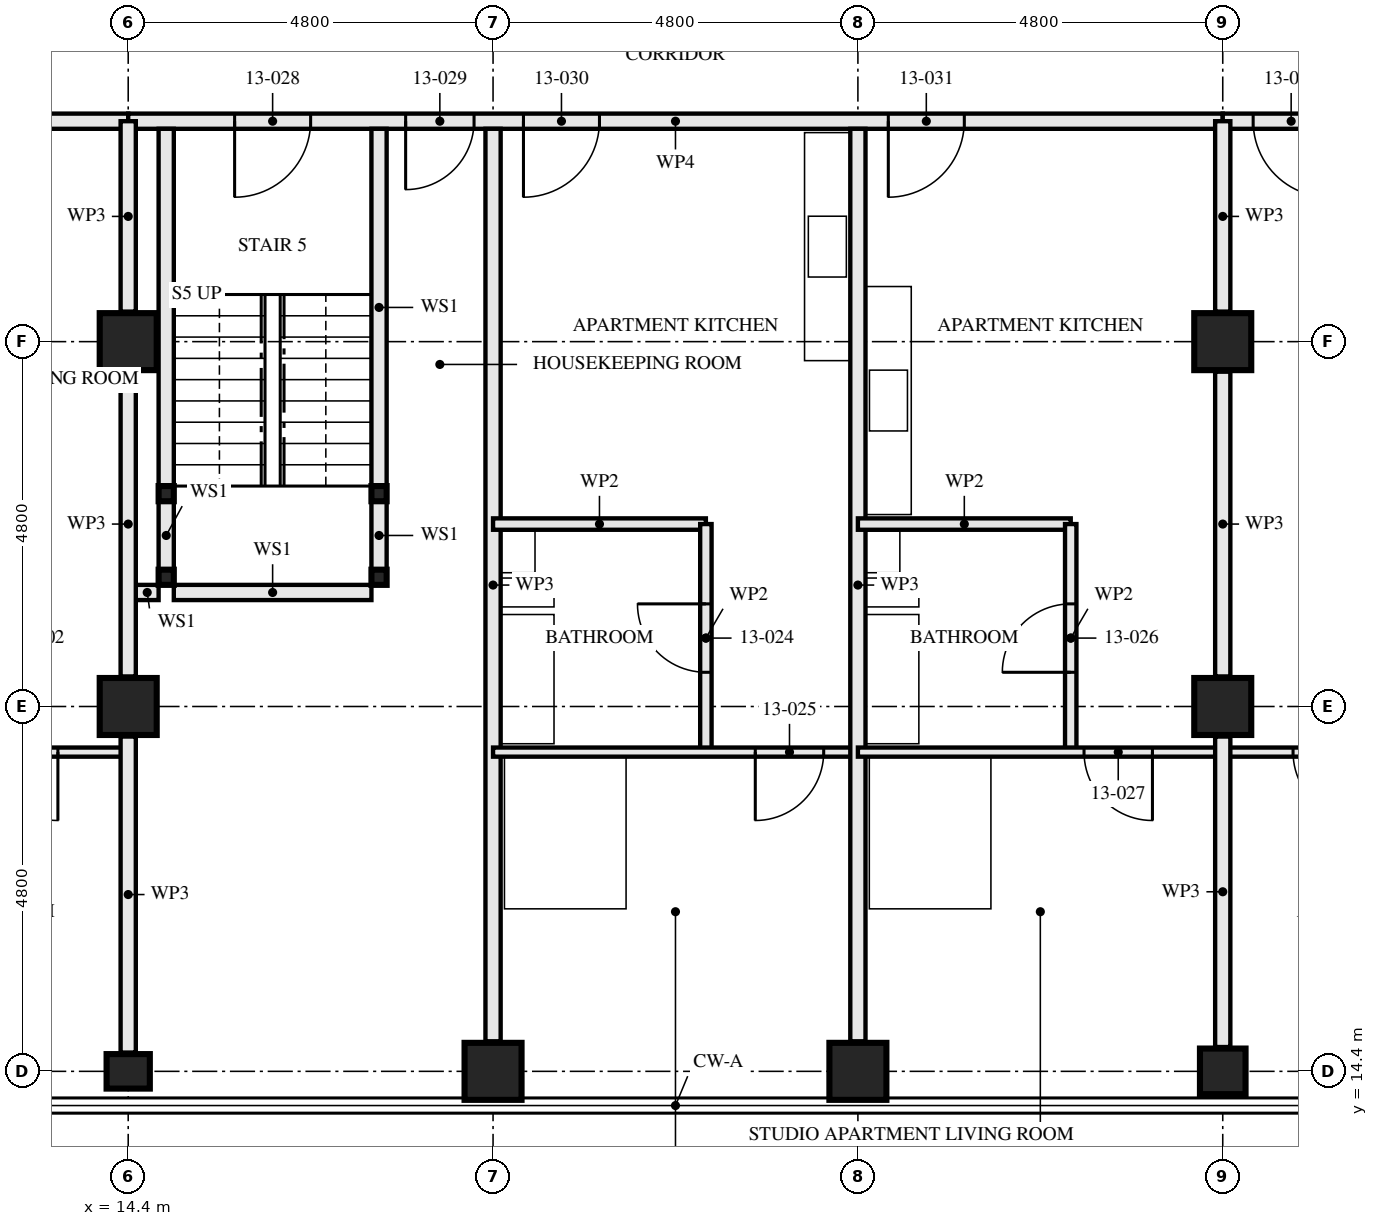
"""IFC4 building model, lengths in metres.
Left out: names, types, materials, properties, quantities, classifications, styles, units other than length and angle.
Written with IfcOpenShell. Run it as: python <this file> out.ifc"""

import sys

from ifc_helpers import new_model, si_unit, direction, frame, frame_2d, origin, origin_2d, place, context, subcontext, project, spatial, rectangle, hollow_rectangle, i_section, extrude, element, fill, save


model = new_model("IFC4")
c1 = context("Model", 3, precision=1e-05, world=origin(), true_north=direction((0.0, 1.0)))
c2 = subcontext(c1, "Body", "Model", "MODEL_VIEW")
j1 = project(units=[si_unit("LENGTHUNIT", "METRE"), si_unit("PLANEANGLEUNIT", "RADIAN")], contexts=[c1])
p1 = place(None, origin())
s1 = spatial("IfcSite", under=j1, at=p1, CompositionType="ELEMENT")
p2 = place(p1, origin())
s2 = spatial("IfcBuilding", under=s1, at=p2, CompositionType="ELEMENT")
p3 = place(p2, frame((0.0, 0.0, 51.5)))
s3 = spatial("IfcBuildingStorey", under=s2, at=p3, CompositionType="ELEMENT", Elevation=51.5)
p4 = place(p3, frame((14.4, 14.4, 0.0), z_axis=(0.0, 0.0, 1.0), x_axis=(0.0, 1.0, 0.0)))
e1 = element("IfcColumn", 1, at=p4, inside=s3, PredefinedType="COLUMN", context=c2, shape_type="SweptSolid", body=[
    extrude(i_section(OverallWidth=0.454, OverallDepth=0.569, WebThickness=0.078, FlangeThickness=0.125, FilletRadius=0.015, at=origin_2d()), origin(), (0.0, 0.0, 1.0), 3.5),
])
for number, where, z_axis, x_axis in (
    (2, (14.4, 19.2, 0.0), (0.0, 0.0, 1.0), (1.0, 0.0, 0.0)),
    (3, (14.4, 24.0, 0.0), (0.0, 0.0, 1.0), (1.0, 0.0, 0.0)),
    (4, (19.2, 14.4, 0.0), (0.0, 0.0, 1.0), (0.0, 1.0, 0.0)),
    (5, (24.0, 14.4, 0.0), (0.0, 0.0, 1.0), (0.0, 1.0, 0.0)),
):
    element("IfcColumn", number, at=place(p3, frame(where, z_axis=z_axis, x_axis=x_axis)), inside=s3, PredefinedType="COLUMN", context=c2, shape_type="SweptSolid", body=[
        extrude(hollow_rectangle(XDim=0.75, YDim=0.75, WallThickness=0.08, at=origin_2d()), origin(), (0.0, 0.0, 1.0), 3.5),
    ])
p5 = place(p3, frame((28.8, 14.4, 0.0), z_axis=(0.0, 0.0, 1.0), x_axis=(0.0, 1.0, 0.0)))
e6 = element("IfcColumn", 6, at=p5, inside=s3, PredefinedType="COLUMN", context=c2, shape_type="SweptSolid", body=[
    extrude(hollow_rectangle(XDim=0.6, YDim=0.6, WallThickness=0.08, at=origin_2d()), origin(), (0.0, 0.0, 1.0), 3.5),
])
for number, where, z_axis, x_axis in (
    (7, (28.8, 19.2, 0.0), (0.0, 0.0, 1.0), (1.0, 0.0, 0.0)),
    (8, (28.8, 24.0, 0.0), (0.0, 0.0, 1.0), (1.0, 0.0, 0.0)),
):
    element("IfcColumn", number, at=place(p3, frame(where, z_axis=z_axis, x_axis=x_axis)), inside=s3, PredefinedType="COLUMN", context=c2, shape_type="SweptSolid", body=[
        extrude(hollow_rectangle(XDim=0.75, YDim=0.75, WallThickness=0.08, at=origin_2d()), origin(), (0.0, 0.0, 1.0), 3.5),
    ])
for number, where, z_axis, x_axis in (
    (9, (14.9, 20.9, 0.0), (0.0, 0.0, 1.0), (1.0, 0.0, 0.0)),
    (10, (17.7, 20.9, 0.0), (0.0, 0.0, 1.0), (1.0, 0.0, 0.0)),
    (11, (14.9, 22.0, 0.0), (0.0, 0.0, 1.0), (1.0, 0.0, 0.0)),
    (12, (17.7, 22.0, 0.0), (0.0, 0.0, 1.0), (1.0, 0.0, 0.0)),
):
    element("IfcColumn", number, at=place(p3, frame(where, z_axis=z_axis, x_axis=x_axis)), inside=s3, PredefinedType="COLUMN", context=c2, shape_type="SweptSolid", body=[
        extrude(hollow_rectangle(XDim=0.2, YDim=0.2, WallThickness=0.008, at=origin_2d()), origin(), (0.0, 0.0, 1.0), 3.33),
    ])
p6 = place(p3, frame((9.6, 18.6, 0.0), z_axis=(0.0, 0.0, 1.0), x_axis=(1.0, 0.0, 0.0)))
e13 = element("IfcWall", 13, at=p6, inside=s3, PredefinedType="PARTITIONING", context=c2, shape_type="SweptSolid", body=[
    extrude(rectangle(XDim=4.8, YDim=0.12, at=frame_2d((2.4, 0.0))), origin(), (0.0, 0.0, 1.0), 3.33),
])
p7 = place(p6, frame((2.975, 0.0, 0.0)))
e14 = element("IfcOpeningElement", 14, at=p7, cuts=e13, PredefinedType="OPENING", context=c2, shape_type="SweptSolid", body=[
    extrude(rectangle(XDim=0.9, YDim=2.1, at=frame_2d((0.45, 1.05))), frame((0.0, 0.071, 0.0), z_axis=(0.0, -1.0, 0.0), x_axis=(1.0, 0.0, 0.0)), (0.0, 0.0, 1.0), 0.141),
])
p8 = place(p3, frame((4.8, 26.9, 0.0), z_axis=(0.0, 0.0, 1.0), x_axis=(1.0, 0.0, 0.0)))
e15 = element("IfcWall", 15, at=p8, inside=s3, PredefinedType="PARTITIONING", context=c2, shape_type="SweptSolid", body=[
    extrude(rectangle(XDim=9.6, YDim=0.2, at=frame_2d((4.8, 0.0))), origin(), (0.0, 0.0, 1.0), 3.33),
])
p9 = place(p8, frame((0.4, 0.0, 0.0)))
e16 = element("IfcOpeningElement", 16, at=p9, cuts=e15, PredefinedType="OPENING", context=c2, shape_type="SweptSolid", body=[
    extrude(rectangle(XDim=1.0, YDim=2.1, at=frame_2d((0.5, 1.05))), frame((0.0, 0.111, 0.0), z_axis=(0.0, -1.0, 0.0), x_axis=(1.0, 0.0, 0.0)), (0.0, 0.0, 1.0), 0.221),
])
p10 = place(p3, frame((14.9, 21.0, 0.0), z_axis=(0.0, 0.0, 1.0), x_axis=(0.0, 1.0, 0.0)))
e17 = element("IfcWall", 17, at=p10, inside=s3, PredefinedType="SOLIDWALL", context=c2, shape_type="SweptSolid", body=[
    extrude(rectangle(XDim=0.9, YDim=0.2, at=frame_2d((0.45, 0.0))), origin(), (0.0, 0.0, 1.0), 2.99),
])
p11 = place(p3, frame((14.9, 22.1, 0.0), z_axis=(0.0, 0.0, 1.0), x_axis=(0.0, 1.0, 0.0)))
e18 = element("IfcWall", 18, at=p11, inside=s3, PredefinedType="SOLIDWALL", context=c2, shape_type="SweptSolid", body=[
    extrude(rectangle(XDim=4.7, YDim=0.2, at=frame_2d((2.35, 0.0))), origin(), (0.0, 0.0, 1.0), 2.99),
])
p12 = place(p3, frame((17.7, 21.0, 0.0), z_axis=(0.0, 0.0, 1.0), x_axis=(0.0, 1.0, 0.0)))
e19 = element("IfcWall", 19, at=p12, inside=s3, PredefinedType="SOLIDWALL", context=c2, shape_type="SweptSolid", body=[
    extrude(rectangle(XDim=0.9, YDim=0.2, at=frame_2d((0.45, 0.0))), origin(), (0.0, 0.0, 1.0), 2.99),
])
p13 = place(p3, frame((17.7, 22.1, 0.0), z_axis=(0.0, 0.0, 1.0), x_axis=(0.0, 1.0, 0.0)))
e20 = element("IfcWall", 20, at=p13, inside=s3, PredefinedType="SOLIDWALL", context=c2, shape_type="SweptSolid", body=[
    extrude(rectangle(XDim=4.7, YDim=0.2, at=frame_2d((2.35, 0.0))), origin(), (0.0, 0.0, 1.0), 2.99),
])
p14 = place(p3, frame((14.5, 20.7, 0.0), z_axis=(0.0, 0.0, 1.0), x_axis=(1.0, 0.0, 0.0)))
e21 = element("IfcWall", 21, at=p14, inside=s3, PredefinedType="SOLIDWALL", context=c2, shape_type="SweptSolid", body=[
    extrude(rectangle(XDim=0.3, YDim=0.2, at=frame_2d((0.15, 0.0))), origin(), (0.0, 0.0, 1.0), 3.33),
])
p15 = place(p3, frame((15.0, 20.7, 0.0), z_axis=(0.0, 0.0, 1.0), x_axis=(1.0, 0.0, 0.0)))
e22 = element("IfcWall", 22, at=p15, inside=s3, PredefinedType="SOLIDWALL", context=c2, shape_type="SweptSolid", body=[
    extrude(rectangle(XDim=2.6, YDim=0.2, at=frame_2d((1.3, 0.0))), origin(), (0.0, 0.0, 1.0), 3.33),
])
p16 = place(p3, frame((19.2, 14.795, 0.0), z_axis=(0.0, 0.0, 1.0), x_axis=(0.0, 1.0, 0.0)))
e23 = element("IfcWall", 23, at=p16, inside=s3, PredefinedType="PARTITIONING", context=c2, shape_type="SweptSolid", body=[
    extrude(rectangle(XDim=12.005, YDim=0.2, at=frame_2d((6.002, 0.0))), origin(), (0.0, 0.0, 1.0), 2.55),
])
p17 = place(p3, frame((22.0, 18.6, 0.0), z_axis=(0.0, 0.0, 1.0), x_axis=(0.0, 1.0, 0.0)))
e24 = element("IfcWall", 24, at=p17, inside=s3, PredefinedType="PARTITIONING", context=c2, shape_type="SweptSolid", body=[
    extrude(rectangle(XDim=3.0, YDim=0.15, at=frame_2d((1.5, 0.0))), origin(), (0.0, 0.0, 1.0), 2.55),
])
p18 = place(p17, frame((1.05, 0.0, 0.0)))
e25 = element("IfcOpeningElement", 25, at=p18, cuts=e24, PredefinedType="OPENING", context=c2, shape_type="SweptSolid", body=[
    extrude(rectangle(XDim=0.9, YDim=2.1, at=frame_2d((0.45, 1.05))), frame((0.0, 0.085, 0.0), z_axis=(0.0, -1.0, 0.0), x_axis=(1.0, 0.0, 0.0)), (0.0, 0.0, 1.0), 0.171),
])
p19 = place(p3, frame((19.2, 21.6, 0.0), z_axis=(0.0, 0.0, 1.0), x_axis=(1.0, 0.0, 0.0)))
e26 = element("IfcWall", 26, at=p19, inside=s3, PredefinedType="PARTITIONING", context=c2, shape_type="SweptSolid", body=[
    extrude(rectangle(XDim=2.8, YDim=0.15, at=frame_2d((1.4, 0.0))), origin(), (0.0, 0.0, 1.0), 3.33),
])
p20 = place(p3, frame((19.2, 18.6, 0.0), z_axis=(0.0, 0.0, 1.0), x_axis=(1.0, 0.0, 0.0)))
e27 = element("IfcWall", 27, at=p20, inside=s3, PredefinedType="PARTITIONING", context=c2, shape_type="SweptSolid", body=[
    extrude(rectangle(XDim=4.8, YDim=0.12, at=frame_2d((2.4, 0.0))), origin(), (0.0, 0.0, 1.0), 3.33),
])
p21 = place(p20, frame((3.45, 0.0, 0.0)))
e28 = element("IfcOpeningElement", 28, at=p21, cuts=e27, PredefinedType="OPENING", context=c2, shape_type="SweptSolid", body=[
    extrude(rectangle(XDim=0.9, YDim=2.1, at=frame_2d((0.45, 1.05))), frame((0.0, 0.071, 0.0), z_axis=(0.0, -1.0, 0.0), x_axis=(1.0, 0.0, 0.0)), (0.0, 0.0, 1.0), 0.141),
])
p22 = place(p3, frame((24.0, 14.795, 0.0), z_axis=(0.0, 0.0, 1.0), x_axis=(0.0, 1.0, 0.0)))
e29 = element("IfcWall", 29, at=p22, inside=s3, PredefinedType="PARTITIONING", context=c2, shape_type="SweptSolid", body=[
    extrude(rectangle(XDim=12.005, YDim=0.2, at=frame_2d((6.002, 0.0))), origin(), (0.0, 0.0, 1.0), 2.55),
])
p23 = place(p3, frame((26.8, 18.6, 0.0), z_axis=(0.0, 0.0, 1.0), x_axis=(0.0, 1.0, 0.0)))
e30 = element("IfcWall", 30, at=p23, inside=s3, PredefinedType="PARTITIONING", context=c2, shape_type="SweptSolid", body=[
    extrude(rectangle(XDim=3.0, YDim=0.15, at=frame_2d((1.5, 0.0))), origin(), (0.0, 0.0, 1.0), 2.55),
])
p24 = place(p23, frame((1.05, 0.0, 0.0)))
e31 = element("IfcOpeningElement", 31, at=p24, cuts=e30, PredefinedType="OPENING", context=c2, shape_type="SweptSolid", body=[
    extrude(rectangle(XDim=0.9, YDim=2.1, at=frame_2d((0.45, 1.05))), frame((0.0, 0.085, 0.0), z_axis=(0.0, -1.0, 0.0), x_axis=(1.0, 0.0, 0.0)), (0.0, 0.0, 1.0), 0.171),
])
p25 = place(p3, frame((24.0, 21.6, 0.0), z_axis=(0.0, 0.0, 1.0), x_axis=(1.0, 0.0, 0.0)))
e32 = element("IfcWall", 32, at=p25, inside=s3, PredefinedType="PARTITIONING", context=c2, shape_type="SweptSolid", body=[
    extrude(rectangle(XDim=2.8, YDim=0.15, at=frame_2d((1.4, 0.0))), origin(), (0.0, 0.0, 1.0), 3.33),
])
p26 = place(p3, frame((24.0, 18.6, 0.0), z_axis=(0.0, 0.0, 1.0), x_axis=(1.0, 0.0, 0.0)))
e33 = element("IfcWall", 33, at=p26, inside=s3, PredefinedType="PARTITIONING", context=c2, shape_type="SweptSolid", body=[
    extrude(rectangle(XDim=4.8, YDim=0.12, at=frame_2d((2.4, 0.0))), origin(), (0.0, 0.0, 1.0), 3.33),
])
p27 = place(p26, frame((2.975, 0.0, 0.0)))
e34 = element("IfcOpeningElement", 34, at=p27, cuts=e33, PredefinedType="OPENING", context=c2, shape_type="SweptSolid", body=[
    extrude(rectangle(XDim=0.9, YDim=2.1, at=frame_2d((0.45, 1.05))), frame((0.0, 0.071, 0.0), z_axis=(0.0, -1.0, 0.0), x_axis=(1.0, 0.0, 0.0)), (0.0, 0.0, 1.0), 0.141),
])
p28 = place(p3, frame((14.4, 26.9, 0.0), z_axis=(0.0, 0.0, 1.0), x_axis=(1.0, 0.0, 0.0)))
e35 = element("IfcWall", 35, at=p28, inside=s3, PredefinedType="PARTITIONING", context=c2, shape_type="SweptSolid", body=[
    extrude(rectangle(XDim=14.4, YDim=0.2, at=frame_2d((7.2, 0.0))), origin(), (0.0, 0.0, 1.0), 2.55),
])
p29 = place(p28, frame((1.4, 0.0, 0.0)))
e36 = element("IfcOpeningElement", 36, at=p29, cuts=e35, PredefinedType="OPENING", context=c2, shape_type="SweptSolid", body=[
    extrude(rectangle(XDim=1.0, YDim=2.1, at=frame_2d((0.5, 1.05))), frame((0.0, 0.111, 0.0), z_axis=(0.0, -1.0, 0.0), x_axis=(1.0, 0.0, 0.0)), (0.0, 0.0, 1.0), 0.221),
])
p30 = place(p28, frame((3.65, 0.0, 0.0)))
e37 = element("IfcOpeningElement", 37, at=p30, cuts=e35, PredefinedType="OPENING", context=c2, shape_type="SweptSolid", body=[
    extrude(rectangle(XDim=0.9, YDim=2.1, at=frame_2d((0.45, 1.05))), frame((0.0, 0.111, 0.0), z_axis=(0.0, -1.0, 0.0), x_axis=(1.0, 0.0, 0.0)), (0.0, 0.0, 1.0), 0.221),
])
p31 = place(p28, frame((5.2, 0.0, 0.0)))
e38 = element("IfcOpeningElement", 38, at=p31, cuts=e35, PredefinedType="OPENING", context=c2, shape_type="SweptSolid", body=[
    extrude(rectangle(XDim=1.0, YDim=2.1, at=frame_2d((0.5, 1.05))), frame((0.0, 0.111, 0.0), z_axis=(0.0, -1.0, 0.0), x_axis=(1.0, 0.0, 0.0)), (0.0, 0.0, 1.0), 0.221),
])
p32 = place(p28, frame((10.0, 0.0, 0.0)))
e39 = element("IfcOpeningElement", 39, at=p32, cuts=e35, PredefinedType="OPENING", context=c2, shape_type="SweptSolid", body=[
    extrude(rectangle(XDim=1.0, YDim=2.1, at=frame_2d((0.5, 1.05))), frame((0.0, 0.111, 0.0), z_axis=(0.0, -1.0, 0.0), x_axis=(1.0, 0.0, 0.0)), (0.0, 0.0, 1.0), 0.221),
])
p33 = place(p3, frame((28.8, 18.6, 0.0), z_axis=(0.0, 0.0, 1.0), x_axis=(1.0, 0.0, 0.0)))
e40 = element("IfcWall", 40, at=p33, inside=s3, PredefinedType="PARTITIONING", context=c2, shape_type="SweptSolid", body=[
    extrude(rectangle(XDim=4.8, YDim=0.12, at=frame_2d((2.4, 0.0))), origin(), (0.0, 0.0, 1.0), 3.33),
])
p34 = place(p33, frame((0.925, 0.0, 0.0)))
e41 = element("IfcOpeningElement", 41, at=p34, cuts=e40, PredefinedType="OPENING", context=c2, shape_type="SweptSolid", body=[
    extrude(rectangle(XDim=0.9, YDim=2.1, at=frame_2d((0.45, 1.05))), frame((0.0, 0.071, 0.0), z_axis=(0.0, -1.0, 0.0), x_axis=(1.0, 0.0, 0.0)), (0.0, 0.0, 1.0), 0.141),
])
p35 = place(p3, frame((28.8, 26.9, 0.0), z_axis=(0.0, 0.0, 1.0), x_axis=(1.0, 0.0, 0.0)))
e42 = element("IfcWall", 42, at=p35, inside=s3, PredefinedType="PARTITIONING", context=c2, shape_type="SweptSolid", body=[
    extrude(rectangle(XDim=9.6, YDim=0.2, at=frame_2d((4.8, 0.0))), origin(), (0.0, 0.0, 1.0), 3.33),
])
p36 = place(p35, frame((0.4, 0.0, 0.0)))
e43 = element("IfcOpeningElement", 43, at=p36, cuts=e42, PredefinedType="OPENING", context=c2, shape_type="SweptSolid", body=[
    extrude(rectangle(XDim=1.0, YDim=2.1, at=frame_2d((0.5, 1.05))), frame((0.0, 0.111, 0.0), z_axis=(0.0, -1.0, 0.0), x_axis=(1.0, 0.0, 0.0)), (0.0, 0.0, 1.0), 0.221),
])
p37 = place(p3, frame((14.4, 14.647, 0.0), z_axis=(0.0, 0.0, 1.0), x_axis=(0.0, 1.0, 0.0)))
e44 = element("IfcWall", 44, at=p37, inside=s3, PredefinedType="PARTITIONING", context=c2, shape_type="SweptSolid", body=[
    extrude(rectangle(XDim=4.158, YDim=0.2, at=frame_2d((2.079, 0.0))), origin(), (0.0, 0.0, 1.0), 2.32),
])
p38 = place(p3, frame((14.4, 19.595, 0.0), z_axis=(0.0, 0.0, 1.0), x_axis=(0.0, 1.0, 0.0)))
e45 = element("IfcWall", 45, at=p38, inside=s3, PredefinedType="PARTITIONING", context=c2, shape_type="SweptSolid", body=[
    extrude(rectangle(XDim=4.01, YDim=0.2, at=frame_2d((2.005, 0.0))), origin(), (0.0, 0.0, 1.0), 2.32),
])
p39 = place(p3, frame((14.4, 24.395, 0.0), z_axis=(0.0, 0.0, 1.0), x_axis=(0.0, 1.0, 0.0)))
e46 = element("IfcWall", 46, at=p39, inside=s3, PredefinedType="PARTITIONING", context=c2, shape_type="SweptSolid", body=[
    extrude(rectangle(XDim=2.505, YDim=0.2, at=frame_2d((1.252, 0.0))), origin(), (0.0, 0.0, 1.0), 2.32),
])
p40 = place(p3, frame((28.8, 14.72, 0.0), z_axis=(0.0, 0.0, 1.0), x_axis=(0.0, 1.0, 0.0)))
e47 = element("IfcWall", 47, at=p40, inside=s3, PredefinedType="PARTITIONING", context=c2, shape_type="SweptSolid", body=[
    extrude(rectangle(XDim=4.085, YDim=0.2, at=frame_2d((2.042, 0.0))), origin(), (0.0, 0.0, 1.0), 2.32),
])
p41 = place(p3, frame((28.8, 19.595, 0.0), z_axis=(0.0, 0.0, 1.0), x_axis=(0.0, 1.0, 0.0)))
e48 = element("IfcWall", 48, at=p41, inside=s3, PredefinedType="PARTITIONING", context=c2, shape_type="SweptSolid", body=[
    extrude(rectangle(XDim=4.01, YDim=0.2, at=frame_2d((2.005, 0.0))), origin(), (0.0, 0.0, 1.0), 2.32),
])
p42 = place(p3, frame((28.8, 24.395, 0.0), z_axis=(0.0, 0.0, 1.0), x_axis=(0.0, 1.0, 0.0)))
e49 = element("IfcWall", 49, at=p42, inside=s3, PredefinedType="PARTITIONING", context=c2, shape_type="SweptSolid", body=[
    extrude(rectangle(XDim=2.505, YDim=0.2, at=frame_2d((1.252, 0.0))), origin(), (0.0, 0.0, 1.0), 2.32),
])
p43 = place(p7, frame((0.9, 0.0, 0.0), z_axis=(0.0, 0.0, 1.0), x_axis=(-1.0, 0.0, 0.0)))
e50 = element("IfcDoor", 50, at=p43, inside=s3, OperationType="SINGLE_SWING_RIGHT", PredefinedType="DOOR", context=c2, shape_type="SweptSolid", body=[
    extrude(rectangle(XDim=0.9, YDim=2.1, at=frame_2d((0.45, 1.05))), frame((0.0, 0.022, 0.0), z_axis=(0.0, -1.0, 0.0), x_axis=(1.0, 0.0, 0.0)), (0.0, 0.0, 1.0), 0.044),
])
fill(e14, e50)
p44 = place(p18, origin())
e51 = element("IfcDoor", 51, at=p44, inside=s3, OperationType="SINGLE_SWING_LEFT", PredefinedType="DOOR", context=c2, shape_type="SweptSolid", body=[
    extrude(rectangle(XDim=0.9, YDim=2.1, at=frame_2d((0.45, 1.05))), frame((0.0, 0.022, 0.0), z_axis=(0.0, -1.0, 0.0), x_axis=(1.0, 0.0, 0.0)), (0.0, 0.0, 1.0), 0.044),
])
fill(e25, e51)
p45 = place(p21, frame((0.9, 0.0, 0.0), z_axis=(0.0, 0.0, 1.0), x_axis=(-1.0, 0.0, 0.0)))
e52 = element("IfcDoor", 52, at=p45, inside=s3, OperationType="SINGLE_SWING_LEFT", PredefinedType="DOOR", context=c2, shape_type="SweptSolid", body=[
    extrude(rectangle(XDim=0.9, YDim=2.1, at=frame_2d((0.45, 1.05))), frame((0.0, 0.022, 0.0), z_axis=(0.0, -1.0, 0.0), x_axis=(1.0, 0.0, 0.0)), (0.0, 0.0, 1.0), 0.044),
])
fill(e28, e52)
p46 = place(p24, origin())
e53 = element("IfcDoor", 53, at=p46, inside=s3, OperationType="SINGLE_SWING_RIGHT", PredefinedType="DOOR", context=c2, shape_type="SweptSolid", body=[
    extrude(rectangle(XDim=0.9, YDim=2.1, at=frame_2d((0.45, 1.05))), frame((0.0, 0.022, 0.0), z_axis=(0.0, -1.0, 0.0), x_axis=(1.0, 0.0, 0.0)), (0.0, 0.0, 1.0), 0.044),
])
fill(e31, e53)
p47 = place(p27, frame((0.9, 0.0, 0.0), z_axis=(0.0, 0.0, 1.0), x_axis=(-1.0, 0.0, 0.0)))
e54 = element("IfcDoor", 54, at=p47, inside=s3, OperationType="SINGLE_SWING_RIGHT", PredefinedType="DOOR", context=c2, shape_type="SweptSolid", body=[
    extrude(rectangle(XDim=0.9, YDim=2.1, at=frame_2d((0.45, 1.05))), frame((0.0, 0.022, 0.0), z_axis=(0.0, -1.0, 0.0), x_axis=(1.0, 0.0, 0.0)), (0.0, 0.0, 1.0), 0.044),
])
fill(e34, e54)
p48 = place(p29, frame((1.0, 0.0, 0.0), z_axis=(0.0, 0.0, 1.0), x_axis=(-1.0, 0.0, 0.0)))
e55 = element("IfcDoor", 55, at=p48, inside=s3, OperationType="SINGLE_SWING_LEFT", PredefinedType="DOOR", context=c2, shape_type="SweptSolid", body=[
    extrude(rectangle(XDim=1.0, YDim=2.1, at=frame_2d((0.5, 1.05))), frame((0.0, 0.032, 0.0), z_axis=(0.0, -1.0, 0.0), x_axis=(1.0, 0.0, 0.0)), (0.0, 0.0, 1.0), 0.064),
])
fill(e36, e55)
p49 = place(p30, frame((0.9, 0.0, 0.0), z_axis=(0.0, 0.0, 1.0), x_axis=(-1.0, 0.0, 0.0)))
e56 = element("IfcDoor", 56, at=p49, inside=s3, OperationType="SINGLE_SWING_LEFT", PredefinedType="DOOR", context=c2, shape_type="SweptSolid", body=[
    extrude(rectangle(XDim=0.9, YDim=2.1, at=frame_2d((0.45, 1.05))), frame((0.0, 0.027, 0.0), z_axis=(0.0, -1.0, 0.0), x_axis=(1.0, 0.0, 0.0)), (0.0, 0.0, 1.0), 0.054),
])
fill(e37, e56)
p50 = place(p31, frame((1.0, 0.0, 0.0), z_axis=(0.0, 0.0, 1.0), x_axis=(-1.0, 0.0, 0.0)))
e57 = element("IfcDoor", 57, at=p50, inside=s3, OperationType="SINGLE_SWING_LEFT", PredefinedType="DOOR", context=c2, shape_type="SweptSolid", body=[
    extrude(rectangle(XDim=1.0, YDim=2.1, at=frame_2d((0.5, 1.05))), frame((0.0, 0.027, 0.0), z_axis=(0.0, -1.0, 0.0), x_axis=(1.0, 0.0, 0.0)), (0.0, 0.0, 1.0), 0.054),
])
fill(e38, e57)
p51 = place(p32, frame((1.0, 0.0, 0.0), z_axis=(0.0, 0.0, 1.0), x_axis=(-1.0, 0.0, 0.0)))
e58 = element("IfcDoor", 58, at=p51, inside=s3, OperationType="SINGLE_SWING_LEFT", PredefinedType="DOOR", context=c2, shape_type="SweptSolid", body=[
    extrude(rectangle(XDim=1.0, YDim=2.1, at=frame_2d((0.5, 1.05))), frame((0.0, 0.027, 0.0), z_axis=(0.0, -1.0, 0.0), x_axis=(1.0, 0.0, 0.0)), (0.0, 0.0, 1.0), 0.054),
])
fill(e39, e58)
p52 = place(p34, frame((0.9, 0.0, 0.0), z_axis=(0.0, 0.0, 1.0), x_axis=(-1.0, 0.0, 0.0)))
e59 = element("IfcDoor", 59, at=p52, inside=s3, OperationType="SINGLE_SWING_RIGHT", PredefinedType="DOOR", context=c2, shape_type="SweptSolid", body=[
    extrude(rectangle(XDim=0.9, YDim=2.1, at=frame_2d((0.45, 1.05))), frame((0.0, 0.022, 0.0), z_axis=(0.0, -1.0, 0.0), x_axis=(1.0, 0.0, 0.0)), (0.0, 0.0, 1.0), 0.044),
])
fill(e41, e59)
p53 = place(p36, frame((1.0, 0.0, 0.0), z_axis=(0.0, 0.0, 1.0), x_axis=(-1.0, 0.0, 0.0)))
e60 = element("IfcDoor", 60, at=p53, inside=s3, OperationType="SINGLE_SWING_RIGHT", PredefinedType="DOOR", context=c2, shape_type="SweptSolid", body=[
    extrude(rectangle(XDim=1.0, YDim=2.1, at=frame_2d((0.5, 1.05))), frame((0.0, 0.027, 0.0), z_axis=(0.0, -1.0, 0.0), x_axis=(1.0, 0.0, 0.0)), (0.0, 0.0, 1.0), 0.054),
])
fill(e43, e60)
save(model, sys.argv[1])
